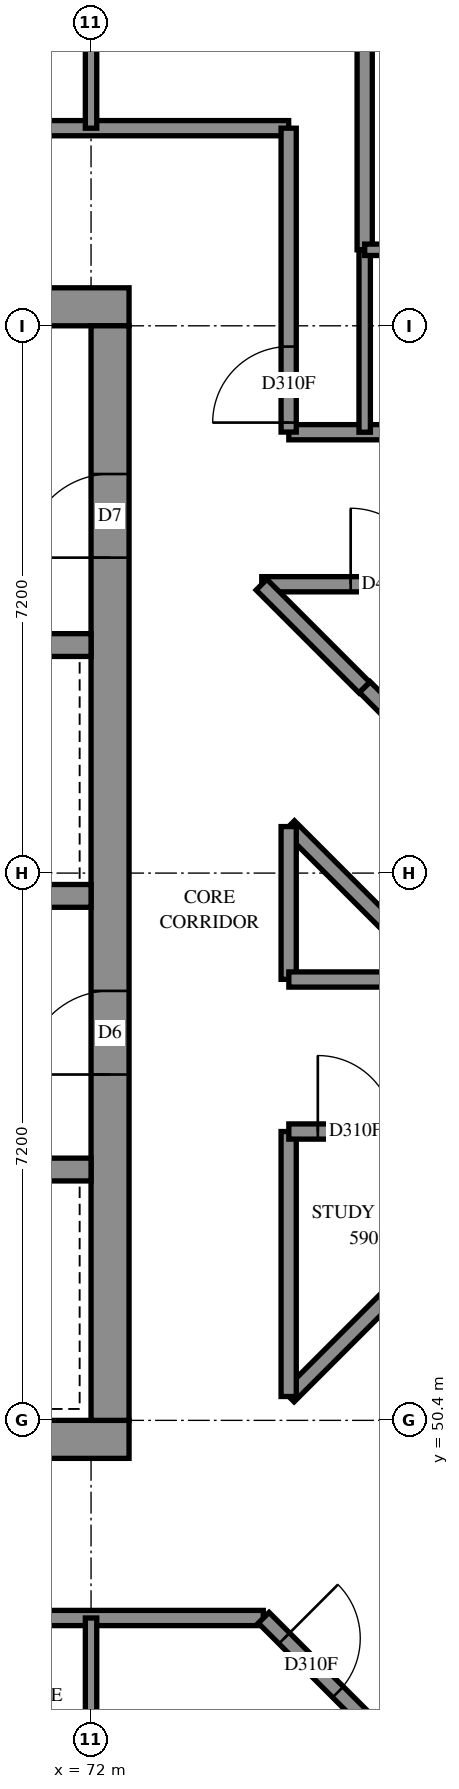
"""IFC4 building model, lengths in metres.
Left out: names, types, materials, properties, quantities, classifications, styles, units other than length and angle.
Written with IfcOpenShell. Run it as: python <this file> out.ifc"""

import sys

from ifc_helpers import new_model, si_unit, direction, frame, frame_2d, origin, place, context, subcontext, project, spatial, rectangle, extrude, element, fill, save


model = new_model("IFC4")
c1 = context("Model", 3, precision=1e-05, world=origin(), true_north=direction((0.0, 1.0)))
c2 = subcontext(c1, "Body", "Model", "MODEL_VIEW")
j1 = project(units=[si_unit("LENGTHUNIT", "METRE"), si_unit("PLANEANGLEUNIT", "RADIAN")], contexts=[c1])
p1 = place(None, origin())
s1 = spatial("IfcSite", under=j1, at=p1, CompositionType="ELEMENT")
p2 = place(p1, origin())
s2 = spatial("IfcBuilding", under=s1, at=p2, CompositionType="ELEMENT")
p3 = place(p2, frame((0.0, 0.0, 216.8)))
s3 = spatial("IfcBuildingStorey", under=s2, at=p3, CompositionType="ELEMENT", Elevation=216.8)
p4 = place(p3, frame((57.1, 50.15, -0.3), z_axis=(0.0, 0.0, 1.0), x_axis=(1.0, 0.0, 0.0)))
e1 = element("IfcWall", 1, at=p4, inside=s3, PredefinedType="SHEAR", context=c2, shape_type="SweptSolid", body=[
    extrude(rectangle(XDim=15.4, YDim=0.5, at=frame_2d((7.7, 0.0))), origin(), (0.0, 0.0, 1.0), 2.7),
])
p5 = place(p3, frame((57.1, 65.05, -0.3), z_axis=(0.0, 0.0, 1.0), x_axis=(1.0, 0.0, 0.0)))
e2 = element("IfcWall", 2, at=p5, inside=s3, PredefinedType="SHEAR", context=c2, shape_type="SweptSolid", body=[
    extrude(rectangle(XDim=15.4, YDim=0.5, at=frame_2d((7.7, 0.0))), origin(), (0.0, 0.0, 1.0), 2.7),
])
p6 = place(p5, frame((10.5, 0.0, 0.3)))
e3 = element("IfcOpeningElement", 3, at=p6, cuts=e2, PredefinedType="OPENING", context=c2, shape_type="SweptSolid", body=[
    extrude(rectangle(XDim=0.8, YDim=2.1, at=frame_2d((0.4, 1.05))), frame((0.0, 0.26, 0.0), z_axis=(0.0, -1.0, 0.0), x_axis=(1.0, 0.0, 0.0)), (0.0, 0.0, 1.0), 0.52),
])
p7 = place(p3, frame((72.25, 50.4, -0.3), z_axis=(0.0, 0.0, 1.0), x_axis=(0.0, 1.0, 0.0)))
e4 = element("IfcWall", 4, at=p7, inside=s3, PredefinedType="SHEAR", context=c2, shape_type="SweptSolid", body=[
    extrude(rectangle(XDim=14.4, YDim=0.5, at=frame_2d((7.2, 0.0))), origin(), (0.0, 0.0, 1.0), 2.7),
])
p8 = place(p7, frame((4.55, 0.0, 0.3)))
e5 = element("IfcOpeningElement", 5, at=p8, cuts=e4, PredefinedType="OPENING", context=c2, shape_type="SweptSolid", body=[
    extrude(rectangle(XDim=1.1, YDim=2.1, at=frame_2d((0.55, 1.05))), frame((0.0, 0.26, 0.0), z_axis=(0.0, -1.0, 0.0), x_axis=(1.0, 0.0, 0.0)), (0.0, 0.0, 1.0), 0.52),
])
p9 = place(p7, frame((11.35, 0.0, 0.3)))
e6 = element("IfcOpeningElement", 6, at=p9, cuts=e4, PredefinedType="OPENING", context=c2, shape_type="SweptSolid", body=[
    extrude(rectangle(XDim=1.1, YDim=2.1, at=frame_2d((0.55, 1.05))), frame((0.0, 0.26, 0.0), z_axis=(0.0, -1.0, 0.0), x_axis=(1.0, 0.0, 0.0)), (0.0, 0.0, 1.0), 0.52),
])
p10 = place(p3, frame((57.6, 53.7, 0.0), z_axis=(0.0, 0.0, 1.0), x_axis=(1.0, 0.0, 0.0)))
e7 = element("IfcWall", 7, at=p10, inside=s3, PredefinedType="SOLIDWALL", context=c2, shape_type="SweptSolid", body=[
    extrude(rectangle(XDim=14.4, YDim=0.3, at=frame_2d((7.2, 0.0))), origin(), (0.0, 0.0, 1.0), 3.1),
])
p11 = place(p10, frame((1.35, 0.0, 0.0)))
e8 = element("IfcOpeningElement", 8, at=p11, cuts=e7, PredefinedType="OPENING", context=c2, shape_type="SweptSolid", body=[
    extrude(rectangle(XDim=0.9, YDim=2.1, at=frame_2d((0.45, 1.05))), frame((0.0, 0.16, 0.0), z_axis=(0.0, -1.0, 0.0), x_axis=(1.0, 0.0, 0.0)), (0.0, 0.0, 1.0), 0.32),
])
p12 = place(p10, frame((4.95, 0.0, 0.0)))
e9 = element("IfcOpeningElement", 9, at=p12, cuts=e7, PredefinedType="OPENING", context=c2, shape_type="SweptSolid", body=[
    extrude(rectangle(XDim=0.9, YDim=2.1, at=frame_2d((0.45, 1.05))), frame((0.0, 0.16, 0.0), z_axis=(0.0, -1.0, 0.0), x_axis=(1.0, 0.0, 0.0)), (0.0, 0.0, 1.0), 0.32),
])
p13 = place(p10, frame((8.55, 0.0, 0.0)))
e10 = element("IfcOpeningElement", 10, at=p13, cuts=e7, PredefinedType="OPENING", context=c2, shape_type="SweptSolid", body=[
    extrude(rectangle(XDim=0.9, YDim=2.1, at=frame_2d((0.45, 1.05))), frame((0.0, 0.16, 0.0), z_axis=(0.0, -1.0, 0.0), x_axis=(1.0, 0.0, 0.0)), (0.0, 0.0, 1.0), 0.32),
])
p14 = place(p10, frame((12.05, 0.0, 0.0)))
e11 = element("IfcOpeningElement", 11, at=p14, cuts=e7, PredefinedType="OPENING", context=c2, shape_type="SweptSolid", body=[
    extrude(rectangle(XDim=1.1, YDim=2.1, at=frame_2d((0.55, 1.05))), frame((0.0, 0.16, 0.0), z_axis=(0.0, -1.0, 0.0), x_axis=(1.0, 0.0, 0.0)), (0.0, 0.0, 1.0), 0.32),
])
p15 = place(p3, frame((57.6, 57.3, 0.0), z_axis=(0.0, 0.0, 1.0), x_axis=(1.0, 0.0, 0.0)))
e12 = element("IfcWall", 12, at=p15, inside=s3, PredefinedType="SOLIDWALL", context=c2, shape_type="SweptSolid", body=[
    extrude(rectangle(XDim=14.4, YDim=0.3, at=frame_2d((7.2, 0.0))), origin(), (0.0, 0.0, 1.0), 3.1),
])
p16 = place(p15, frame((1.25, 0.0, 0.0)))
e13 = element("IfcOpeningElement", 13, at=p16, cuts=e12, PredefinedType="OPENING", context=c2, shape_type="SweptSolid", body=[
    extrude(rectangle(XDim=1.1, YDim=2.1, at=frame_2d((0.55, 1.05))), frame((0.0, 0.16, 0.0), z_axis=(0.0, -1.0, 0.0), x_axis=(1.0, 0.0, 0.0)), (0.0, 0.0, 1.0), 0.32),
])
p17 = place(p15, frame((4.85, 0.0, 0.0)))
e14 = element("IfcOpeningElement", 14, at=p17, cuts=e12, PredefinedType="OPENING", context=c2, shape_type="SweptSolid", body=[
    extrude(rectangle(XDim=1.1, YDim=2.1, at=frame_2d((0.55, 1.05))), frame((0.0, 0.16, 0.0), z_axis=(0.0, -1.0, 0.0), x_axis=(1.0, 0.0, 0.0)), (0.0, 0.0, 1.0), 0.32),
])
p18 = place(p15, frame((8.45, 0.0, 0.0)))
e15 = element("IfcOpeningElement", 15, at=p18, cuts=e12, PredefinedType="OPENING", context=c2, shape_type="SweptSolid", body=[
    extrude(rectangle(XDim=1.1, YDim=2.1, at=frame_2d((0.55, 1.05))), frame((0.0, 0.16, 0.0), z_axis=(0.0, -1.0, 0.0), x_axis=(1.0, 0.0, 0.0)), (0.0, 0.0, 1.0), 0.32),
])
p19 = place(p15, frame((12.05, 0.0, 0.0)))
e16 = element("IfcOpeningElement", 16, at=p19, cuts=e12, PredefinedType="OPENING", context=c2, shape_type="SweptSolid", body=[
    extrude(rectangle(XDim=1.1, YDim=2.1, at=frame_2d((0.55, 1.05))), frame((0.0, 0.16, 0.0), z_axis=(0.0, -1.0, 0.0), x_axis=(1.0, 0.0, 0.0)), (0.0, 0.0, 1.0), 0.32),
])
p20 = place(p3, frame((64.8, 60.6, 0.0), z_axis=(0.0, 0.0, 1.0), x_axis=(1.0, 0.0, 0.0)))
e17 = element("IfcWall", 17, at=p20, inside=s3, PredefinedType="SOLIDWALL", context=c2, shape_type="SweptSolid", body=[
    extrude(rectangle(XDim=7.2, YDim=0.3, at=frame_2d((3.6, 0.0))), origin(), (0.0, 0.0, 1.0), 3.1),
])
p21 = place(p3, frame((55.0, 67.4, 0.0), z_axis=(0.0, 0.0, 1.0), x_axis=(1.0, 0.0, 0.0)))
e18 = element("IfcWall", 18, at=p21, inside=s3, PredefinedType="PARTITIONING", context=c2, shape_type="SweptSolid", body=[
    extrude(rectangle(XDim=19.6, YDim=0.2, at=frame_2d((9.8, 0.0))), origin(), (0.0, 0.0, 1.0), 3.1),
])
p22 = place(p21, frame((4.9, 0.0, 0.0)))
e19 = element("IfcOpeningElement", 19, at=p22, cuts=e18, PredefinedType="OPENING", context=c2, shape_type="SweptSolid", body=[
    extrude(rectangle(XDim=0.9, YDim=2.1, at=frame_2d((0.45, 1.05))), frame((0.0, 0.11, 0.0), z_axis=(0.0, -1.0, 0.0), x_axis=(1.0, 0.0, 0.0)), (0.0, 0.0, 1.0), 0.22),
])
p23 = place(p21, frame((8.539, 0.0, 0.0)))
e20 = element("IfcOpeningElement", 20, at=p23, cuts=e18, PredefinedType="OPENING", context=c2, shape_type="SweptSolid", body=[
    extrude(rectangle(XDim=0.9, YDim=2.1, at=frame_2d((0.45, 1.05))), frame((0.0, 0.11, 0.0), z_axis=(0.0, -1.0, 0.0), x_axis=(1.0, 0.0, 0.0)), (0.0, 0.0, 1.0), 0.22),
])
p24 = place(p21, frame((13.8, 0.0, 0.0)))
e21 = element("IfcOpeningElement", 21, at=p24, cuts=e18, PredefinedType="OPENING", context=c2, shape_type="SweptSolid", body=[
    extrude(rectangle(XDim=0.9, YDim=2.1, at=frame_2d((0.45, 1.05))), frame((0.0, 0.11, 0.0), z_axis=(0.0, -1.0, 0.0), x_axis=(1.0, 0.0, 0.0)), (0.0, 0.0, 1.0), 0.22),
])
p25 = place(p3, frame((55.0, 47.8, 0.0), z_axis=(0.0, 0.0, 1.0), x_axis=(1.0, 0.0, 0.0)))
e22 = element("IfcWall", 22, at=p25, inside=s3, PredefinedType="PARTITIONING", context=c2, shape_type="SweptSolid", body=[
    extrude(rectangle(XDim=19.266, YDim=0.2, at=frame_2d((9.633, 0.0))), origin(), (0.0, 0.0, 1.0), 3.1),
])
p26 = place(p25, frame((4.9, 0.0, 0.0)))
e23 = element("IfcOpeningElement", 23, at=p26, cuts=e22, PredefinedType="OPENING", context=c2, shape_type="SweptSolid", body=[
    extrude(rectangle(XDim=0.9, YDim=2.1, at=frame_2d((0.45, 1.05))), frame((0.0, 0.11, 0.0), z_axis=(0.0, -1.0, 0.0), x_axis=(1.0, 0.0, 0.0)), (0.0, 0.0, 1.0), 0.22),
])
p27 = place(p25, frame((8.457, 0.0, 0.0)))
e24 = element("IfcOpeningElement", 24, at=p27, cuts=e22, PredefinedType="OPENING", context=c2, shape_type="SweptSolid", body=[
    extrude(rectangle(XDim=0.9, YDim=2.1, at=frame_2d((0.45, 1.05))), frame((0.0, 0.11, 0.0), z_axis=(0.0, -1.0, 0.0), x_axis=(1.0, 0.0, 0.0)), (0.0, 0.0, 1.0), 0.22),
])
p28 = place(p25, frame((13.8, 0.0, 0.0)))
e25 = element("IfcOpeningElement", 25, at=p28, cuts=e22, PredefinedType="OPENING", context=c2, shape_type="SweptSolid", body=[
    extrude(rectangle(XDim=0.9, YDim=2.1, at=frame_2d((0.45, 1.05))), frame((0.0, 0.11, 0.0), z_axis=(0.0, -1.0, 0.0), x_axis=(1.0, 0.0, 0.0)), (0.0, 0.0, 1.0), 0.22),
])
p29 = place(p3, frame((75.6, 65.8, 0.0), z_axis=(0.0, 0.0, 1.0), x_axis=(0.0, 1.0, 0.0)))
e26 = element("IfcWall", 26, at=p29, inside=s3, PredefinedType="PARTITIONING", context=c2, shape_type="SweptSolid", body=[
    extrude(rectangle(XDim=6.999, YDim=0.2, at=frame_2d((3.499, 0.0))), origin(), (0.0, 0.0, 1.0), 3.1),
])
p30 = place(p3, frame((74.246, 61.4, 0.0), z_axis=(0.0, 0.0, 1.0), x_axis=(1.0, 0.0, 0.0)))
e27 = element("IfcWall", 27, at=p30, inside=s3, PredefinedType="PARTITIONING", context=c2, shape_type="SweptSolid", body=[
    extrude(rectangle(XDim=4.954, YDim=0.2, at=frame_2d((2.477, 0.0))), origin(), (0.0, 0.0, 1.0), 3.1),
])
p31 = place(p30, frame((1.17, 0.0, 0.0)))
e28 = element("IfcOpeningElement", 28, at=p31, cuts=e27, PredefinedType="OPENING", context=c2, shape_type="SweptSolid", body=[
    extrude(rectangle(XDim=1.0, YDim=2.1, at=frame_2d((0.5, 1.05))), frame((0.0, 0.11, 0.0), z_axis=(0.0, -1.0, 0.0), x_axis=(1.0, 0.0, 0.0)), (0.0, 0.0, 1.0), 0.22),
])
p32 = place(p3, frame((74.601, 50.715, 0.0), z_axis=(0.0, 0.0, 1.0), x_axis=(0.7071067812, 0.7071067812, 0.0)))
e29 = element("IfcWall", 29, at=p32, inside=s3, PredefinedType="PARTITIONING", context=c2, shape_type="SweptSolid", body=[
    extrude(rectangle(XDim=4.927, YDim=0.2, at=frame_2d((2.464, 0.0))), origin(), (0.0, 0.0, 1.0), 3.1),
])
p33 = place(p3, frame((74.272, 47.803, 0.0), z_axis=(0.0, 0.0, 1.0), x_axis=(0.7071067812, -0.7071067812, 0.0)))
e30 = element("IfcWall", 30, at=p33, inside=s3, PredefinedType="PARTITIONING", context=c2, shape_type="SweptSolid", body=[
    extrude(rectangle(XDim=4.641, YDim=0.2, at=frame_2d((2.321, 0.0))), origin(), (0.0, 0.0, 1.0), 3.1),
])
p34 = place(p33, frame((0.382, 0.0, 0.0)))
e31 = element("IfcOpeningElement", 31, at=p34, cuts=e30, PredefinedType="OPENING", context=c2, shape_type="SweptSolid", body=[
    extrude(rectangle(XDim=1.0, YDim=2.1, at=frame_2d((0.5, 1.05))), frame((0.0, 0.11, 0.0), z_axis=(0.0, -1.0, 0.0), x_axis=(1.0, 0.0, 0.0)), (0.0, 0.0, 1.0), 0.22),
])
p35 = place(p3, frame((74.602, 63.4, 0.0), z_axis=(0.0, 0.0, 1.0), x_axis=(1.0, 0.0, 0.0)))
e32 = element("IfcWall", 32, at=p35, inside=s3, PredefinedType="PARTITIONING", context=c2, shape_type="SweptSolid", body=[
    extrude(rectangle(XDim=4.598, YDim=0.2, at=frame_2d((2.299, 0.0))), origin(), (0.0, 0.0, 1.0), 3.1),
])
p36 = place(p35, frame((3.298, 0.0, 0.0)))
e33 = element("IfcOpeningElement", 33, at=p36, cuts=e32, PredefinedType="OPENING", context=c2, shape_type="SweptSolid", body=[
    extrude(rectangle(XDim=0.9, YDim=2.1, at=frame_2d((0.45, 1.05))), frame((0.0, 0.11, 0.0), z_axis=(0.0, -1.0, 0.0), x_axis=(1.0, 0.0, 0.0)), (0.0, 0.0, 1.0), 0.22),
])
p37 = place(p3, frame((74.6, 63.402, 0.0), z_axis=(0.0, 0.0, 1.0), x_axis=(0.0, 1.0, 0.0)))
e34 = element("IfcWall", 34, at=p37, inside=s3, PredefinedType="PARTITIONING", context=c2, shape_type="SweptSolid", body=[
    extrude(rectangle(XDim=3.998, YDim=0.2, at=frame_2d((1.999, 0.0))), origin(), (0.0, 0.0, 1.0), 3.1),
])
p38 = place(p37, frame((0.125, 0.0, 0.0)))
e35 = element("IfcOpeningElement", 35, at=p38, cuts=e34, PredefinedType="OPENING", context=c2, shape_type="SweptSolid", body=[
    extrude(rectangle(XDim=1.0, YDim=2.1, at=frame_2d((0.5, 1.05))), frame((0.0, 0.11, 0.0), z_axis=(0.0, -1.0, 0.0), x_axis=(1.0, 0.0, 0.0)), (0.0, 0.0, 1.0), 0.22),
])
p39 = place(p3, frame((74.6, 50.714, 0.0), z_axis=(0.0, 0.0, 1.0), x_axis=(0.0, 1.0, 0.0)))
e36 = element("IfcWall", 36, at=p39, inside=s3, PredefinedType="PARTITIONING", context=c2, shape_type="SweptSolid", body=[
    extrude(rectangle(XDim=3.486, YDim=0.2, at=frame_2d((1.743, 0.0))), origin(), (0.0, 0.0, 1.0), 3.1),
])
p40 = place(p3, frame((74.602, 54.2, 0.0), z_axis=(0.0, 0.0, 1.0), x_axis=(1.0, 0.0, 0.0)))
e37 = element("IfcWall", 37, at=p40, inside=s3, PredefinedType="PARTITIONING", context=c2, shape_type="SweptSolid", body=[
    extrude(rectangle(XDim=3.484, YDim=0.2, at=frame_2d((1.742, 0.0))), origin(), (0.0, 0.0, 1.0), 3.1),
])
p41 = place(p40, frame((0.382, 0.0, 0.0)))
e38 = element("IfcOpeningElement", 38, at=p41, cuts=e37, PredefinedType="OPENING", context=c2, shape_type="SweptSolid", body=[
    extrude(rectangle(XDim=1.0, YDim=2.1, at=frame_2d((0.5, 1.05))), frame((0.0, 0.11, 0.0), z_axis=(0.0, -1.0, 0.0), x_axis=(1.0, 0.0, 0.0)), (0.0, 0.0, 1.0), 0.22),
])
p42 = place(p3, frame((74.606, 58.218, 0.0), z_axis=(0.0, 0.0, 1.0), x_axis=(0.7071067812, -0.7071067812, 0.0)))
e39 = element("IfcWall", 39, at=p42, inside=s3, PredefinedType="PARTITIONING", context=c2, shape_type="SweptSolid", body=[
    extrude(rectangle(XDim=2.845, YDim=0.2, at=frame_2d((1.423, 0.0))), origin(), (0.0, 0.0, 1.0), 3.1),
])
for number, where, z_axis, x_axis in (
    (40, (72.0, 45.4, 0.0), (0.0, 0.0, 1.0), (0.0, 1.0, 0.0)),
    (41, (75.6, 63.4, 0.0), (0.0, 0.0, 1.0), (0.0, 1.0, 0.0)),
    (42, (72.0, 67.4, 0.0), (0.0, 0.0, 1.0), (0.0, 1.0, 0.0)),
):
    element("IfcWall", number, at=place(p3, frame(where, z_axis=z_axis, x_axis=x_axis)), inside=s3, PredefinedType="PARTITIONING", context=c2, shape_type="SweptSolid", body=[
        extrude(rectangle(XDim=2.4, YDim=0.15, at=frame_2d((1.2, 0.0))), origin(), (0.0, 0.0, 1.0), 3.1),
    ])
for number, where, z_axis, x_axis in (
    (43, (74.6, 56.202, 0.0), (0.0, 0.0, 1.0), (0.0, 1.0, 0.0)),
    (44, (74.602, 56.2, 0.0), (0.0, 0.0, 1.0), (1.0, 0.0, 0.0)),
):
    element("IfcWall", number, at=place(p3, frame(where, z_axis=z_axis, x_axis=x_axis)), inside=s3, PredefinedType="PARTITIONING", context=c2, shape_type="SweptSolid", body=[
        extrude(rectangle(XDim=2.01, YDim=0.2, at=frame_2d((1.005, 0.0))), origin(), (0.0, 0.0, 1.0), 3.1),
    ])
p43 = place(p3, frame((74.243, 61.395, 0.0), z_axis=(0.0, 0.0, 1.0), x_axis=(0.7071067812, -0.7071067812, 0.0)))
e45 = element("IfcWall", 45, at=p43, inside=s3, PredefinedType="PARTITIONING", context=c2, shape_type="SweptSolid", body=[
    extrude(rectangle(XDim=1.915, YDim=0.2, at=frame_2d((0.957, 0.0))), origin(), (0.0, 0.0, 1.0), 3.1),
])
p44 = place(p3, frame((75.6, 65.8, 0.0), z_axis=(0.0, 0.0, 1.0), x_axis=(1.0, 0.0, 0.0)))
e46 = element("IfcWall", 46, at=p44, inside=s3, PredefinedType="PARTITIONING", context=c2, shape_type="SweptSolid", body=[
    extrude(rectangle(XDim=1.9, YDim=0.15, at=frame_2d((0.95, 0.0))), origin(), (0.0, 0.0, 1.0), 3.1),
])
p45 = place(p44, frame((0.502, 0.0, 0.0)))
e47 = element("IfcOpeningElement", 47, at=p45, cuts=e46, PredefinedType="OPENING", context=c2, shape_type="SweptSolid", body=[
    extrude(rectangle(XDim=0.8, YDim=2.1, at=frame_2d((0.4, 1.05))), frame((0.0, 0.085, 0.0), z_axis=(0.0, -1.0, 0.0), x_axis=(1.0, 0.0, 0.0)), (0.0, 0.0, 1.0), 0.17),
])
p46 = place(p3, frame((75.602, 60.046, 0.0), z_axis=(0.0, 0.0, 1.0), x_axis=(0.7063318703, -0.7078808437, 0.0)))
e48 = element("IfcWall", 48, at=p46, inside=s3, PredefinedType="PARTITIONING", context=c2, shape_type="SweptSolid", body=[
    extrude(rectangle(XDim=1.291, YDim=0.2, at=frame_2d((0.646, 0.0))), origin(), (0.0, 0.0, 1.0), 3.1),
])
p47 = place(p8, origin())
e49 = element("IfcDoor", 49, at=p47, inside=s3, OperationType="DOUBLE_DOOR_SINGLE_SWING", PredefinedType="DOOR", context=c2, shape_type="SweptSolid", body=[
    extrude(rectangle(XDim=1.1, YDim=2.1, at=frame_2d((0.55, 1.05))), frame((0.0, 0.025, 0.0), z_axis=(0.0, -1.0, 0.0), x_axis=(1.0, 0.0, 0.0)), (0.0, 0.0, 1.0), 0.05),
])
fill(e5, e49)
p48 = place(p9, origin())
e50 = element("IfcDoor", 50, at=p48, inside=s3, OperationType="SINGLE_SWING_RIGHT", PredefinedType="DOOR", context=c2, shape_type="SweptSolid", body=[
    extrude(rectangle(XDim=1.1, YDim=2.1, at=frame_2d((0.55, 1.05))), frame((0.0, 0.025, 0.0), z_axis=(0.0, -1.0, 0.0), x_axis=(1.0, 0.0, 0.0)), (0.0, 0.0, 1.0), 0.05),
])
fill(e6, e50)
p49 = place(p41, origin())
e51 = element("IfcDoor", 51, at=p49, inside=s3, OperationType="SINGLE_SWING_RIGHT", PredefinedType="DOOR", context=c2, shape_type="SweptSolid", body=[
    extrude(rectangle(XDim=1.0, YDim=2.1, at=frame_2d((0.5, 1.05))), frame((0.0, 0.025, 0.0), z_axis=(0.0, -1.0, 0.0), x_axis=(1.0, 0.0, 0.0)), (0.0, 0.0, 1.0), 0.05),
])
fill(e38, e51)
p50 = place(p38, origin())
e52 = element("IfcDoor", 52, at=p50, inside=s3, OperationType="SINGLE_SWING_RIGHT", PredefinedType="DOOR", context=c2, shape_type="SweptSolid", body=[
    extrude(rectangle(XDim=1.0, YDim=2.1, at=frame_2d((0.5, 1.05))), frame((0.0, 0.025, 0.0), z_axis=(0.0, -1.0, 0.0), x_axis=(1.0, 0.0, 0.0)), (0.0, 0.0, 1.0), 0.05),
])
fill(e35, e52)
p51 = place(p34, origin())
e53 = element("IfcDoor", 53, at=p51, inside=s3, OperationType="SINGLE_SWING_LEFT", PredefinedType="DOOR", context=c2, shape_type="SweptSolid", body=[
    extrude(rectangle(XDim=1.0, YDim=2.1, at=frame_2d((0.5, 1.05))), frame((0.0, 0.025, 0.0), z_axis=(0.0, -1.0, 0.0), x_axis=(1.0, 0.0, 0.0)), (0.0, 0.0, 1.0), 0.05),
])
fill(e31, e53)
p52 = place(p31, origin())
e54 = element("IfcDoor", 54, at=p52, inside=s3, OperationType="SINGLE_SWING_RIGHT", PredefinedType="DOOR", context=c2, shape_type="SweptSolid", body=[
    extrude(rectangle(XDim=1.0, YDim=2.1, at=frame_2d((0.5, 1.05))), frame((0.0, 0.025, 0.0), z_axis=(0.0, -1.0, 0.0), x_axis=(1.0, 0.0, 0.0)), (0.0, 0.0, 1.0), 0.05),
])
fill(e28, e54)
save(model, sys.argv[1])
